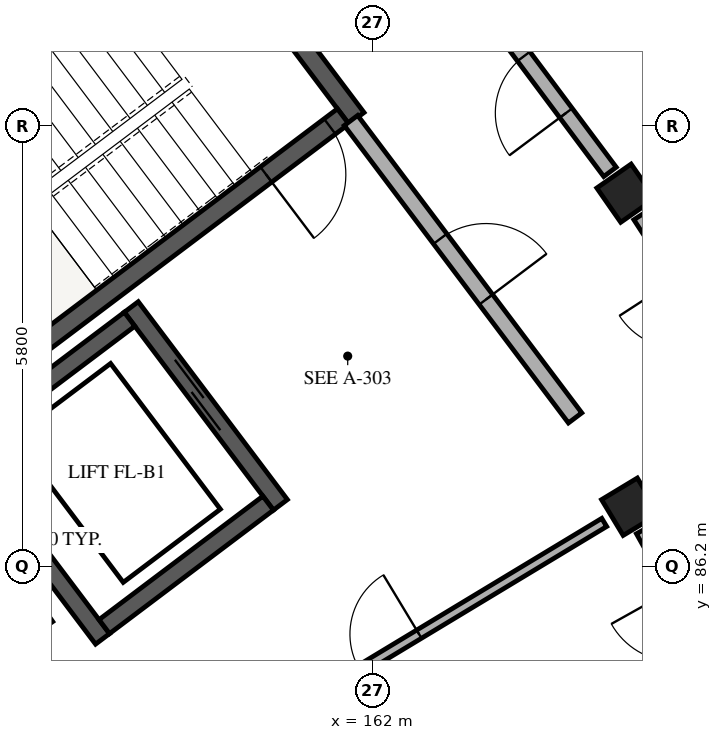
"""IFC4 building model, lengths in metres.
Left out: names, types, materials, properties, quantities, classifications, styles, units other than length and angle.
Written with IfcOpenShell. Run it as: python <this file> out.ifc"""

import sys

from ifc_helpers import new_model, si_unit, direction, frame, frame_2d, origin, origin_2d, place, context, subcontext, project, spatial, rectangle, extrude, element, fill, save


model = new_model("IFC4")
c1 = context("Model", 3, precision=1e-05, world=origin(), true_north=direction((0.0, 1.0)))
c2 = subcontext(c1, "Body", "Model", "MODEL_VIEW")
j1 = project(units=[si_unit("LENGTHUNIT", "METRE"), si_unit("PLANEANGLEUNIT", "RADIAN")], contexts=[c1])
p1 = place(None, origin())
s1 = spatial("IfcSite", under=j1, at=p1, CompositionType="ELEMENT")
p2 = place(p1, origin())
s2 = spatial("IfcBuilding", under=s1, at=p2, CompositionType="ELEMENT")
p3 = place(p2, frame((0.0, 0.0, 18.92)))
s3 = spatial("IfcBuildingStorey", under=s2, at=p3, CompositionType="ELEMENT", Elevation=18.92)
p4 = place(p3, frame((159.707, 94.658, 0.0), z_axis=(0.0, 0.0, 1.0), x_axis=(-0.798639633744, -0.601809550782, 0.0)))
e1 = element("IfcWall", 1, at=p4, inside=s3, PredefinedType="SHEAR", context=c2, shape_type="SweptSolid", body=[
    extrude(rectangle(XDim=6.6, YDim=0.25, at=frame_2d((3.3, 0.0))), origin(), (0.0, 0.0, 1.0), 3.11),
])
p5 = place(p3, frame((159.731, 94.833, 0.0), z_axis=(0.0, 0.0, 1.0), x_axis=(0.601814606132, -0.798635824294, 0.0)))
e2 = element("IfcWall", 2, at=p5, inside=s3, PredefinedType="SHEAR", context=c2, shape_type="SweptSolid", body=[
    extrude(rectangle(XDim=3.42, YDim=0.25, at=frame_2d((1.71, 0.0))), origin(), (0.0, 0.0, 1.0), 3.11),
])
p6 = place(p3, frame((161.615, 92.126, 0.0), z_axis=(0.0, 0.0, 1.0), x_axis=(-0.798639633744, -0.601809550782, 0.0)))
e3 = element("IfcWall", 3, at=p6, inside=s3, PredefinedType="SHEAR", context=c2, shape_type="SweptSolid", body=[
    extrude(rectangle(XDim=6.6, YDim=0.25, at=frame_2d((3.3, 0.0))), origin(), (0.0, 0.0, 1.0), 3.11),
])
p7 = place(p6, frame((0.22, 0.0, 0.0)))
e4 = element("IfcOpeningElement", 4, at=p7, cuts=e3, PredefinedType="OPENING", context=c2, shape_type="SweptSolid", body=[
    extrude(rectangle(XDim=1.05, YDim=2.15, at=frame_2d((0.525, 1.075))), frame((0.0, 0.135, 0.0), z_axis=(0.0, -1.0, 0.0), x_axis=(1.0, 0.0, 0.0)), (0.0, 0.0, 1.0), 0.27),
])
p8 = place(p3, frame((158.827, 89.619, 0.0), z_axis=(0.0, 0.0, 1.0), x_axis=(0.601819781152, -0.798631924615, 0.0)))
e5 = element("IfcWall", 5, at=p8, inside=s3, PredefinedType="SHEAR", context=c2, shape_type="SweptSolid", body=[
    extrude(rectangle(XDim=3.26, YDim=0.23, at=frame_2d((1.63, 0.0))), origin(), (0.0, 0.0, 1.0), 3.11),
])
p9 = place(p8, frame((0.9, 0.0, 0.0)))
e6 = element("IfcOpeningElement", 6, at=p9, cuts=e5, PredefinedType="OPENING", context=c2, shape_type="SweptSolid", body=[
    extrude(rectangle(XDim=1.1, YDim=2.15, at=frame_2d((0.55, 1.075))), frame((0.0, 0.125, 0.0), z_axis=(0.0, -1.0, 0.0), x_axis=(1.0, 0.0, 0.0)), (0.0, 0.0, 1.0), 0.25),
])
p10 = place(p3, frame((156.487, 87.856, 0.0), z_axis=(0.0, 0.0, 1.0), x_axis=(0.601819781152, -0.798631924615, 0.0)))
e7 = element("IfcWall", 7, at=p10, inside=s3, PredefinedType="SHEAR", context=c2, shape_type="SweptSolid", body=[
    extrude(rectangle(XDim=3.26, YDim=0.23, at=frame_2d((1.63, 0.0))), origin(), (0.0, 0.0, 1.0), 3.11),
])
for number, where, z_axis, x_axis in (
    (8, (158.805, 89.458, 0.0), (0.0, 0.0, 1.0), (-0.799, -0.602, 0.0)),
    (9, (160.628, 87.038, 0.0), (0.0, 0.0, 1.0), (-0.799, -0.602, 0.0)),
):
    element("IfcWall", number, at=place(p3, frame(where, z_axis=z_axis, x_axis=x_axis)), inside=s3, PredefinedType="SHEAR", context=c2, shape_type="SweptSolid", body=[
        extrude(rectangle(XDim=2.7, YDim=0.23, at=frame_2d((1.35, 0.0))), origin(), (0.0, 0.0, 1.0), 3.11),
    ])
p11 = place(p3, frame((165.392, 86.991, 0.0), z_axis=(0.0, 0.0, 1.0), x_axis=(0.856166891514, 0.516699384434, 0.0)))
e10 = element("IfcColumn", 10, at=p11, inside=s3, PredefinedType="COLUMN", context=c2, shape_type="SweptSolid", body=[
    extrude(rectangle(XDim=0.55, YDim=0.55, at=origin_2d()), origin(), (0.0, 0.0, 1.0), 3.11),
])
p12 = place(p3, frame((157.461, 85.625, 0.0), z_axis=(0.0, 0.0, 1.0), x_axis=(0.820262803018, 0.571986830255, 0.0)))
e11 = element("IfcColumn", 11, at=p12, inside=s3, PredefinedType="PILASTER", context=c2, shape_type="SweptSolid", body=[
    extrude(rectangle(XDim=0.38, YDim=0.62, at=origin_2d()), origin(), (0.0, 0.0, 1.0), 3.11),
])
p13 = place(p3, frame((165.335, 91.116, 0.0), z_axis=(0.0, 0.0, 1.0), x_axis=(0.820262803018, 0.571986830255, 0.0)))
e12 = element("IfcColumn", 12, at=p13, inside=s3, PredefinedType="COLUMN", context=c2, shape_type="SweptSolid", body=[
    extrude(rectangle(XDim=0.55, YDim=0.55, at=origin_2d()), origin(), (0.0, 0.0, 1.0), 3.11),
])
p14 = place(p3, frame((161.718, 92.073, 0.0), z_axis=(0.0, 0.0, 1.0), x_axis=(0.601792209296, -0.79865270101, 0.0)))
e13 = element("IfcWall", 13, at=p14, inside=s3, PredefinedType="PARTITIONING", context=c2, shape_type="SweptSolid", body=[
    extrude(rectangle(XDim=4.9, YDim=0.22, at=frame_2d((2.45, 0.0))), origin(), (0.0, 0.0, 1.0), 2.34),
])
p15 = place(p14, frame((1.95, 0.0, 0.0)))
e14 = element("IfcOpeningElement", 14, at=p15, cuts=e13, PredefinedType="OPENING", context=c2, shape_type="SweptSolid", body=[
    extrude(rectangle(XDim=1.0, YDim=2.15, at=frame_2d((0.5, 1.075))), frame((0.0, 0.12, 0.0), z_axis=(0.0, -1.0, 0.0), x_axis=(1.0, 0.0, 0.0)), (0.0, 0.0, 1.0), 0.24),
])
p16 = place(p3, frame((166.89, 84.313, 0.0), z_axis=(0.0, 0.0, 1.0), x_axis=(-0.48819576874, 0.872734147025, 0.0)))
e15 = element("IfcWall", 15, at=p16, inside=s3, PredefinedType="PARTITIONING", context=c2, shape_type="SweptSolid", body=[
    extrude(rectangle(XDim=2.718, YDim=0.205, at=frame_2d((1.359, 0.0))), origin(), (0.0, 0.0, 1.0), 2.37),
])
p17 = place(p16, frame((0.874, 0.0, 0.0)))
e16 = element("IfcOpeningElement", 16, at=p17, cuts=e15, PredefinedType="OPENING", context=c2, shape_type="SweptSolid", body=[
    extrude(rectangle(XDim=0.97, YDim=2.15, at=frame_2d((0.485, 1.075))), frame((0.0, 0.113, 0.0), z_axis=(0.0, -1.0, 0.0), x_axis=(1.0, 0.0, 0.0)), (0.0, 0.0, 1.0), 0.225),
])
p18 = place(p3, frame((159.399, 83.374, 0.0), z_axis=(0.0, 0.0, 1.0), x_axis=(0.85616819337, 0.516697227263, 0.0)))
e17 = element("IfcWall", 17, at=p18, inside=s3, PredefinedType="PARTITIONING", context=c2, shape_type="SweptSolid", body=[
    extrude(rectangle(XDim=6.6, YDim=0.125, at=frame_2d((3.3, 0.0))), origin(), (0.0, 0.0, 1.0), 2.37),
])
p19 = place(p18, frame((2.845, 0.0, 0.0)))
e18 = element("IfcOpeningElement", 18, at=p19, cuts=e17, PredefinedType="OPENING", context=c2, shape_type="SweptSolid", body=[
    extrude(rectangle(XDim=0.91, YDim=2.1, at=frame_2d((0.455, 1.05))), frame((0.0, 0.073, 0.0), z_axis=(0.0, -1.0, 0.0), x_axis=(1.0, 0.0, 0.0)), (0.0, 0.0, 1.0), 0.145),
])
p20 = place(p3, frame((167.085, 88.421, 0.0), z_axis=(0.0, 0.0, 1.0), x_axis=(-0.544643612649, 0.838667595178, 0.0)))
e19 = element("IfcWall", 19, at=p20, inside=s3, PredefinedType="PARTITIONING", context=c2, shape_type="SweptSolid", body=[
    extrude(rectangle(XDim=2.863, YDim=0.205, at=frame_2d((1.432, 0.0))), origin(), (0.0, 0.0, 1.0), 2.37),
])
p21 = place(p20, frame((0.957, 0.0, 0.0)))
e20 = element("IfcOpeningElement", 20, at=p21, cuts=e19, PredefinedType="OPENING", context=c2, shape_type="SweptSolid", body=[
    extrude(rectangle(XDim=0.95, YDim=2.13, at=frame_2d((0.475, 1.065))), frame((0.0, 0.113, 0.0), z_axis=(0.0, -1.0, 0.0), x_axis=(1.0, 0.0, 0.0)), (0.0, 0.0, 1.0), 0.225),
])
p22 = place(p3, frame((165.126, 91.396, 0.0), z_axis=(0.0, 0.0, 1.0), x_axis=(-0.598757763243, 0.800930172335, 0.0)))
e21 = element("IfcWall", 21, at=p22, inside=s3, PredefinedType="PARTITIONING", context=c2, shape_type="SweptSolid", body=[
    extrude(rectangle(XDim=2.863, YDim=0.205, at=frame_2d((1.432, 0.0))), origin(), (0.0, 0.0, 1.0), 2.37),
])
p23 = place(p22, frame((0.967, 0.0, 0.0)))
e22 = element("IfcOpeningElement", 22, at=p23, cuts=e21, PredefinedType="OPENING", context=c2, shape_type="SweptSolid", body=[
    extrude(rectangle(XDim=0.93, YDim=2.12, at=frame_2d((0.465, 1.06))), frame((0.0, 0.113, 0.0), z_axis=(0.0, -1.0, 0.0), x_axis=(1.0, 0.0, 0.0)), (0.0, 0.0, 1.0), 0.225),
])
p24 = place(p7, origin())
e23 = element("IfcDoor", 23, at=p24, inside=s3, OperationType="SINGLE_SWING_RIGHT", PredefinedType="DOOR", context=c2, shape_type="SweptSolid", body=[
    extrude(rectangle(XDim=1.05, YDim=2.15, at=frame_2d((0.525, 1.075))), frame((0.0, 0.025, 0.0), z_axis=(0.0, -1.0, 0.0), x_axis=(1.0, 0.0, 0.0)), (0.0, 0.0, 1.0), 0.05),
])
fill(e4, e23)
p25 = place(p9, origin())
e24 = element("IfcDoor", 24, at=p25, inside=s3, OperationType="DOUBLE_DOOR_SLIDING", PredefinedType="DOOR", context=c2, shape_type="SweptSolid", body=[
    extrude(rectangle(XDim=1.1, YDim=2.15, at=frame_2d((0.55, 1.075))), frame((0.0, 0.025, 0.0), z_axis=(0.0, -1.0, 0.0), x_axis=(1.0, 0.0, 0.0)), (0.0, 0.0, 1.0), 0.05),
])
fill(e6, e24)
p26 = place(p15, origin())
e25 = element("IfcDoor", 25, at=p26, inside=s3, OperationType="SINGLE_SWING_RIGHT", PredefinedType="DOOR", context=c2, shape_type="SweptSolid", body=[
    extrude(rectangle(XDim=1.0, YDim=2.15, at=frame_2d((0.5, 1.075))), frame((0.0, 0.025, 0.0), z_axis=(0.0, -1.0, 0.0), x_axis=(1.0, 0.0, 0.0)), (0.0, 0.0, 1.0), 0.05),
])
fill(e14, e25)
p27 = place(p19, origin())
e26 = element("IfcDoor", 26, at=p27, inside=s3, OperationType="SINGLE_SWING_RIGHT", PredefinedType="DOOR", context=c2, shape_type="SweptSolid", body=[
    extrude(rectangle(XDim=0.91, YDim=2.1, at=frame_2d((0.455, 1.05))), frame((0.0, 0.025, 0.0), z_axis=(0.0, -1.0, 0.0), x_axis=(1.0, 0.0, 0.0)), (0.0, 0.0, 1.0), 0.05),
])
fill(e18, e26)
p28 = place(p23, origin())
e27 = element("IfcDoor", 27, at=p28, inside=s3, OperationType="SINGLE_SWING_LEFT", PredefinedType="DOOR", context=c2, shape_type="SweptSolid", body=[
    extrude(rectangle(XDim=0.93, YDim=2.12, at=frame_2d((0.465, 1.06))), frame((0.0, 0.025, 0.0), z_axis=(0.0, -1.0, 0.0), x_axis=(1.0, 0.0, 0.0)), (0.0, 0.0, 1.0), 0.05),
])
fill(e22, e27)
save(model, sys.argv[1])
